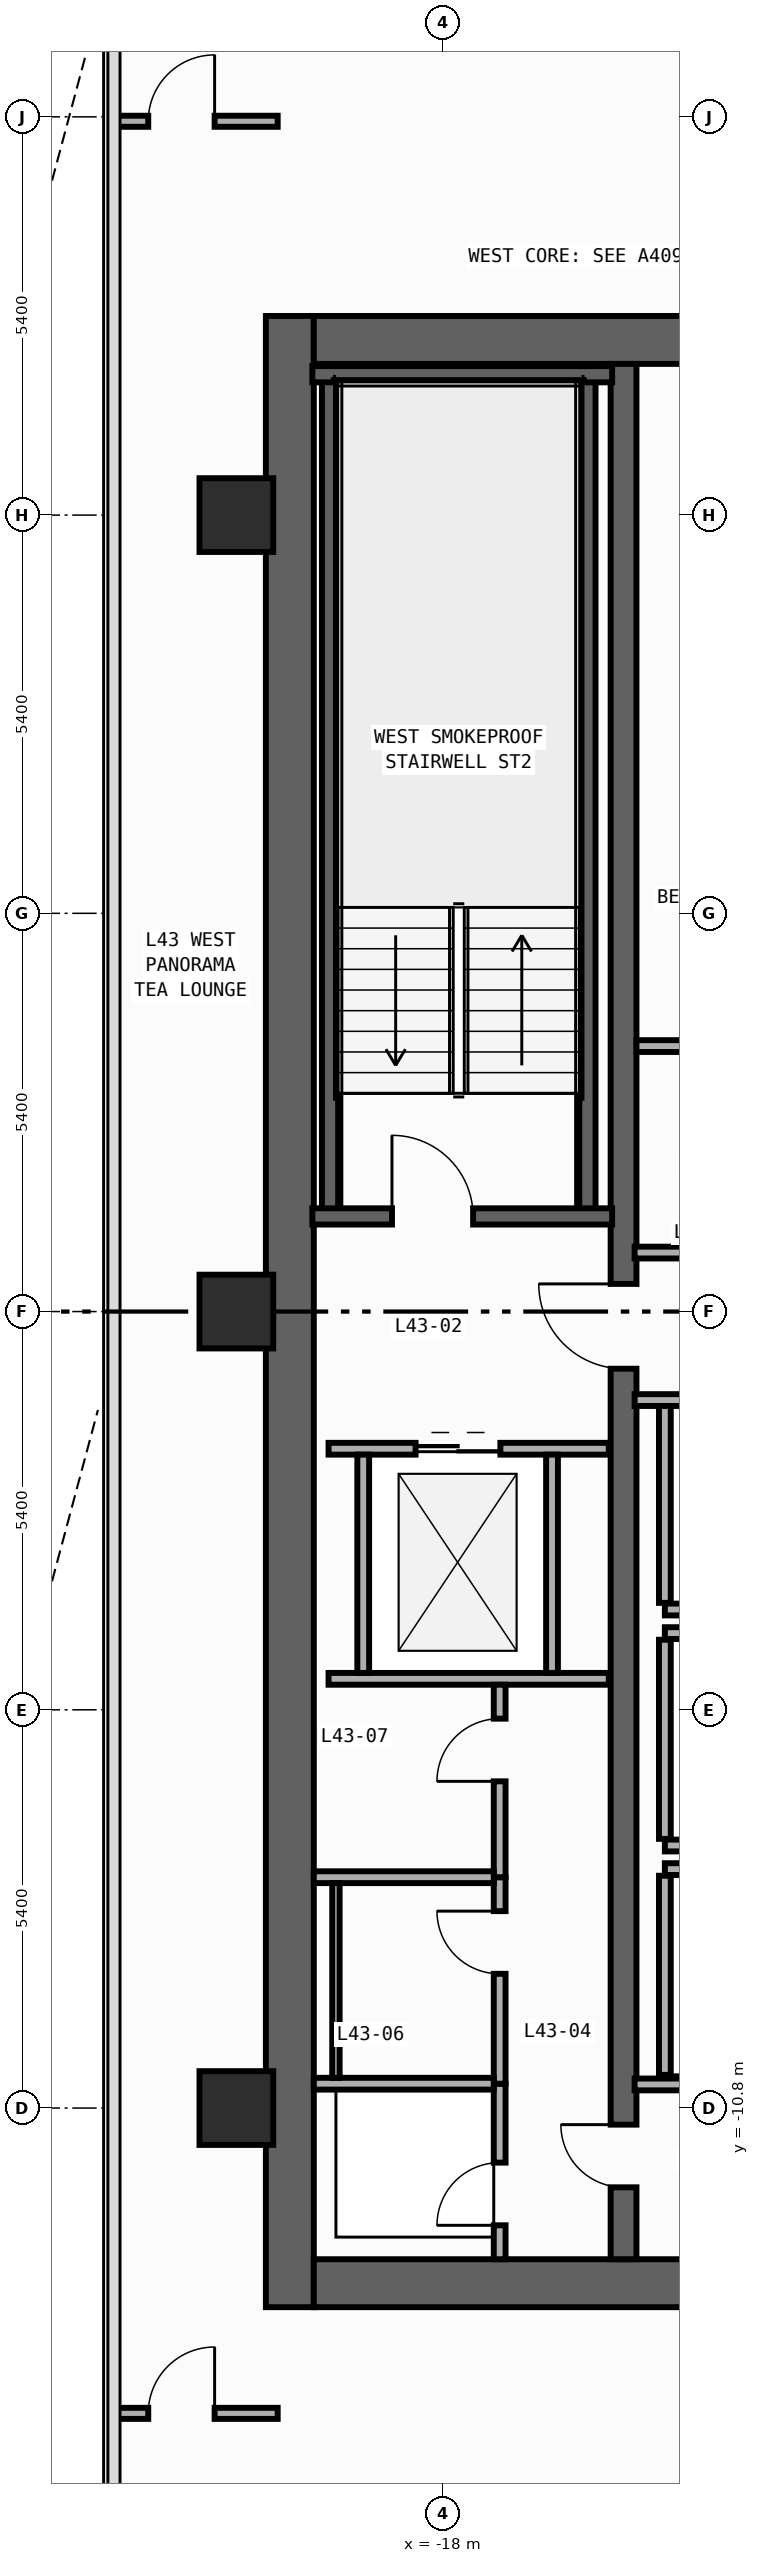
"""IFC4 building model, lengths in metres.
Left out: names, types, materials, properties, quantities, classifications, styles, units other than length and angle.
Written with IfcOpenShell. Run it as: python <this file> out.ifc"""

import sys

from ifc_helpers import new_model, si_unit, direction, frame, frame_2d, origin, origin_2d, place, context, subcontext, project, spatial, rectangle, extrude, element, fill, save


model = new_model("IFC4")
c1 = context("Model", 3, precision=1e-05, world=origin(), true_north=direction((0.0, 1.0)))
c2 = subcontext(c1, "Body", "Model", "MODEL_VIEW")
j1 = project(units=[si_unit("LENGTHUNIT", "METRE"), si_unit("PLANEANGLEUNIT", "RADIAN")], contexts=[c1])
p1 = place(None, origin())
s1 = spatial("IfcSite", under=j1, at=p1, CompositionType="ELEMENT")
p2 = place(p1, origin())
s2 = spatial("IfcBuilding", under=s1, at=p2, CompositionType="ELEMENT")
p3 = place(p2, frame((0.0, 0.0, 187.8)))
s3 = spatial("IfcBuildingStorey", under=s2, at=p3, CompositionType="ELEMENT", Elevation=187.8)
p4 = place(p3, frame((-20.075, -13.5, 0.0), z_axis=(0.0, 0.0, 1.0), x_axis=(0.0, 1.0, 0.0)))
e1 = element("IfcWall", 1, at=p4, inside=s3, PredefinedType="SHEAR", context=c2, shape_type="SweptSolid", body=[
    extrude(rectangle(XDim=27.0, YDim=0.65, at=frame_2d((13.5, 0.0))), origin(), (0.0, 0.0, 1.0), 3.54),
])
for number, where, z_axis, x_axis in (
    (2, (-19.75, -13.175, 0.0), (0.0, 0.0, 1.0), (1.0, 0.0, 0.0)),
    (3, (-19.75, 13.175, 0.0), (0.0, 0.0, 1.0), (1.0, 0.0, 0.0)),
):
    element("IfcWall", number, at=place(p3, frame(where, z_axis=z_axis, x_axis=x_axis)), inside=s3, PredefinedType="SHEAR", context=c2, shape_type="SweptSolid", body=[
        extrude(rectangle(XDim=7.1, YDim=0.65, at=frame_2d((3.55, 0.0))), origin(), (0.0, 0.0, 1.0), 3.54),
    ])
p5 = place(p3, frame((-15.55, -12.85, 0.0), z_axis=(0.0, 0.0, 1.0), x_axis=(0.0, 1.0, 0.0)))
e4 = element("IfcWall", 4, at=p5, inside=s3, PredefinedType="SHEAR", context=c2, shape_type="SweptSolid", body=[
    extrude(rectangle(XDim=25.7, YDim=0.35, at=frame_2d((12.85, 0.0))), origin(), (0.0, 0.0, 1.0), 3.54),
])
p6 = place(p5, frame((12.075, 0.0, 0.0)))
e5 = element("IfcOpeningElement", 5, at=p6, cuts=e4, PredefinedType="OPENING", context=c2, shape_type="SweptSolid", body=[
    extrude(rectangle(XDim=1.15, YDim=2.2, at=frame_2d((0.575, 1.1))), frame((0.0, 0.185, 0.0), z_axis=(0.0, -1.0, 0.0), x_axis=(1.0, 0.0, 0.0)), (0.0, 0.0, 1.0), 0.37),
])
p7 = place(p5, frame((0.975, 0.0, 0.0)))
e6 = element("IfcOpeningElement", 6, at=p7, cuts=e4, PredefinedType="OPENING", context=c2, shape_type="SweptSolid", body=[
    extrude(rectangle(XDim=0.85, YDim=2.1, at=frame_2d((0.425, 1.05))), frame((0.0, 0.185, 0.0), z_axis=(0.0, -1.0, 0.0), x_axis=(1.0, 0.0, 0.0)), (0.0, 0.0, 1.0), 0.37),
])
for number, where, z_axis, x_axis in (
    (7, (-16.04, 1.29, 0.0), (0.0, 0.0, 1.0), (0.0, 1.0, 0.0)),
    (8, (-19.53, 1.29, 0.0), (0.0, 0.0, 1.0), (0.0, 1.0, 0.0)),
):
    element("IfcWall", number, at=place(p3, frame(where, z_axis=z_axis, x_axis=x_axis)), inside=s3, PredefinedType="SHEAR", context=c2, shape_type="SweptSolid", body=[
        extrude(rectangle(XDim=11.42, YDim=0.22, at=frame_2d((5.71, 0.0))), origin(), (0.0, 0.0, 1.0), 3.54),
    ])
p8 = place(p3, frame((-19.77, 12.71, 0.0), z_axis=(0.0, 0.0, 1.0), x_axis=(1.0, 0.0, 0.0)))
e9 = element("IfcWall", 9, at=p8, inside=s3, PredefinedType="SHEAR", context=c2, shape_type="SweptSolid", body=[
    extrude(rectangle(XDim=4.065, YDim=0.22, at=frame_2d((2.032, 0.0))), origin(), (0.0, 0.0, 1.0), 3.54),
])
p9 = place(p3, frame((-19.77, 1.29, 0.0), z_axis=(0.0, 0.0, 1.0), x_axis=(1.0, 0.0, 0.0)))
e10 = element("IfcWall", 10, at=p9, inside=s3, PredefinedType="SHEAR", context=c2, shape_type="SweptSolid", body=[
    extrude(rectangle(XDim=4.065, YDim=0.22, at=frame_2d((2.032, 0.0))), origin(), (0.0, 0.0, 1.0), 3.54),
])
p10 = place(p9, frame((1.08, 0.0, 0.0)))
e11 = element("IfcOpeningElement", 11, at=p10, cuts=e10, PredefinedType="OPENING", context=c2, shape_type="SweptSolid", body=[
    extrude(rectangle(XDim=1.1, YDim=2.2, at=frame_2d((0.55, 1.1))), frame((0.0, 0.12, 0.0), z_axis=(0.0, -1.0, 0.0), x_axis=(1.0, 0.0, 0.0)), (0.0, 0.0, 1.0), 0.24),
])
for number, where, z_axis, x_axis in (
    (12, (-20.8, -10.8, 0.0), (0.0, 0.0, 1.0), (1.0, 0.0, 0.0)),
    (13, (-20.8, 0.0, 0.0), (0.0, 0.0, 1.0), (1.0, 0.0, 0.0)),
    (14, (-20.8, 10.8, 0.0), (0.0, 0.0, 1.0), (1.0, 0.0, 0.0)),
):
    element("IfcColumn", number, at=place(p3, frame(where, z_axis=z_axis, x_axis=x_axis)), inside=s3, PredefinedType="COLUMN", context=c2, shape_type="SweptSolid", body=[
        extrude(rectangle(XDim=1.0, YDim=1.0, at=origin_2d()), origin(), (0.0, 0.0, 1.0), 3.8),
    ])
p11 = place(p3, frame((-14.99, -4.04, 0.0), z_axis=(0.0, 0.0, 1.0), x_axis=(1.0, 0.0, 0.0)))
e15 = element("IfcWall", 15, at=p11, inside=s3, PredefinedType="STANDARD", context=c2, shape_type="SweptSolid", body=[
    extrude(rectangle(XDim=2.34, YDim=0.16, at=frame_2d((1.17, 0.0))), origin(), (0.0, 0.0, 1.0), 3.54),
])
p12 = place(p3, frame((-14.99, -3.95, 0.0), z_axis=(0.0, 0.0, 1.0), x_axis=(0.0, 1.0, 0.0)))
e16 = element("IfcWall", 16, at=p12, inside=s3, PredefinedType="STANDARD", context=c2, shape_type="SweptSolid", body=[
    extrude(rectangle(XDim=2.7, YDim=0.16, at=frame_2d((1.35, 0.0))), origin(), (0.0, 0.0, 1.0), 3.54),
])
for number, where, z_axis, x_axis in (
    (17, (-14.99, -7.24, 0.0), (0.0, 0.0, 1.0), (1.0, 0.0, 0.0)),
    (18, (-14.99, -4.36, 0.0), (0.0, 0.0, 1.0), (1.0, 0.0, 0.0)),
):
    element("IfcWall", number, at=place(p3, frame(where, z_axis=z_axis, x_axis=x_axis)), inside=s3, PredefinedType="STANDARD", context=c2, shape_type="SweptSolid", body=[
        extrude(rectangle(XDim=2.34, YDim=0.16, at=frame_2d((1.17, 0.0))), origin(), (0.0, 0.0, 1.0), 3.54),
    ])
p13 = place(p3, frame((-14.99, -7.15, 0.0), z_axis=(0.0, 0.0, 1.0), x_axis=(0.0, 1.0, 0.0)))
e19 = element("IfcWall", 19, at=p13, inside=s3, PredefinedType="STANDARD", context=c2, shape_type="SweptSolid", body=[
    extrude(rectangle(XDim=2.7, YDim=0.16, at=frame_2d((1.35, 0.0))), origin(), (0.0, 0.0, 1.0), 3.54),
])
p14 = place(p3, frame((-14.99, -7.56, 0.0), z_axis=(0.0, 0.0, 1.0), x_axis=(1.0, 0.0, 0.0)))
e20 = element("IfcWall", 20, at=p14, inside=s3, PredefinedType="STANDARD", context=c2, shape_type="SweptSolid", body=[
    extrude(rectangle(XDim=2.34, YDim=0.16, at=frame_2d((1.17, 0.0))), origin(), (0.0, 0.0, 1.0), 3.54),
])
p15 = place(p3, frame((-14.99, -10.35, 0.0), z_axis=(0.0, 0.0, 1.0), x_axis=(0.0, 1.0, 0.0)))
e21 = element("IfcWall", 21, at=p15, inside=s3, PredefinedType="STANDARD", context=c2, shape_type="SweptSolid", body=[
    extrude(rectangle(XDim=2.7, YDim=0.16, at=frame_2d((1.35, 0.0))), origin(), (0.0, 0.0, 1.0), 3.54),
])
p16 = place(p3, frame((-19.55, -1.86, 0.0), z_axis=(0.0, 0.0, 1.0), x_axis=(1.0, 0.0, 0.0)))
e22 = element("IfcWall", 22, at=p16, inside=s3, PredefinedType="STANDARD", context=c2, shape_type="SweptSolid", body=[
    extrude(rectangle(XDim=3.8, YDim=0.16, at=frame_2d((1.9, 0.0))), origin(), (0.0, 0.0, 1.0), 3.54),
])
p17 = place(p16, frame((1.18, 0.0, 0.0)))
e23 = element("IfcOpeningElement", 23, at=p17, cuts=e22, PredefinedType="OPENING", context=c2, shape_type="SweptSolid", body=[
    extrude(rectangle(XDim=1.15, YDim=2.2, at=frame_2d((0.575, 1.1))), frame((0.0, 0.09, 0.0), z_axis=(0.0, -1.0, 0.0), x_axis=(1.0, 0.0, 0.0)), (0.0, 0.0, 1.0), 0.18),
])
p18 = place(p3, frame((-19.55, -4.98, 0.0), z_axis=(0.0, 0.0, 1.0), x_axis=(1.0, 0.0, 0.0)))
e24 = element("IfcWall", 24, at=p18, inside=s3, PredefinedType="STANDARD", context=c2, shape_type="SweptSolid", body=[
    extrude(rectangle(XDim=3.8, YDim=0.16, at=frame_2d((1.9, 0.0))), origin(), (0.0, 0.0, 1.0), 3.54),
])
for number, where, z_axis, x_axis in (
    (25, (-19.08, -4.9, 0.0), (0.0, 0.0, 1.0), (0.0, 1.0, 0.0)),
    (26, (-16.52, -4.9, 0.0), (0.0, 0.0, 1.0), (0.0, 1.0, 0.0)),
):
    element("IfcWall", number, at=place(p3, frame(where, z_axis=z_axis, x_axis=x_axis)), inside=s3, PredefinedType="STANDARD", context=c2, shape_type="SweptSolid", body=[
        extrude(rectangle(XDim=2.96, YDim=0.16, at=frame_2d((1.48, 0.0))), origin(), (0.0, 0.0, 1.0), 3.54),
    ])
for number, where, z_axis, x_axis in (
    (27, (-15.4, 0.8, 0.0), (0.0, 0.0, 1.0), (1.0, 0.0, 0.0)),
    (28, (-15.4, -1.2, 0.0), (0.0, 0.0, 1.0), (1.0, 0.0, 0.0)),
    (29, (-15.4, -10.48, 0.0), (0.0, 0.0, 1.0), (1.0, 0.0, 0.0)),
):
    element("IfcWall", number, at=place(p3, frame(where, z_axis=z_axis, x_axis=x_axis)), inside=s3, PredefinedType="STANDARD", context=c2, shape_type="SweptSolid", body=[
        extrude(rectangle(XDim=2.6, YDim=0.16, at=frame_2d((1.3, 0.0))), origin(), (0.0, 0.0, 1.0), 3.54),
    ])
p19 = place(p3, frame((-17.23, -12.85, 0.0), z_axis=(0.0, 0.0, 1.0), x_axis=(0.0, 1.0, 0.0)))
e30 = element("IfcWall", 30, at=p19, inside=s3, PredefinedType="PARTITIONING", context=c2, shape_type="SweptSolid", body=[
    extrude(rectangle(XDim=2.38, YDim=0.16, at=frame_2d((1.19, 0.0))), origin(), (0.0, 0.0, 1.0), 3.54),
])
p20 = place(p19, frame((0.46, 0.0, 0.0)))
e31 = element("IfcOpeningElement", 31, at=p20, cuts=e30, PredefinedType="OPENING", context=c2, shape_type="SweptSolid", body=[
    extrude(rectangle(XDim=0.85, YDim=2.1, at=frame_2d((0.425, 1.05))), frame((0.0, 0.09, 0.0), z_axis=(0.0, -1.0, 0.0), x_axis=(1.0, 0.0, 0.0)), (0.0, 0.0, 1.0), 0.18),
])
p21 = place(p3, frame((-17.23, -10.47, 0.0), z_axis=(0.0, 0.0, 1.0), x_axis=(0.0, 1.0, 0.0)))
e32 = element("IfcWall", 32, at=p21, inside=s3, PredefinedType="PARTITIONING", context=c2, shape_type="SweptSolid", body=[
    extrude(rectangle(XDim=2.8, YDim=0.16, at=frame_2d((1.4, 0.0))), origin(), (0.0, 0.0, 1.0), 3.54),
])
p22 = place(p21, frame((1.49, 0.0, 0.0)))
e33 = element("IfcOpeningElement", 33, at=p22, cuts=e32, PredefinedType="OPENING", context=c2, shape_type="SweptSolid", body=[
    extrude(rectangle(XDim=0.85, YDim=2.1, at=frame_2d((0.425, 1.05))), frame((0.0, 0.09, 0.0), z_axis=(0.0, -1.0, 0.0), x_axis=(1.0, 0.0, 0.0)), (0.0, 0.0, 1.0), 0.18),
])
p23 = place(p3, frame((-17.23, -7.67, 0.0), z_axis=(0.0, 0.0, 1.0), x_axis=(0.0, 1.0, 0.0)))
e34 = element("IfcWall", 34, at=p23, inside=s3, PredefinedType="PARTITIONING", context=c2, shape_type="SweptSolid", body=[
    extrude(rectangle(XDim=2.61, YDim=0.16, at=frame_2d((1.305, 0.0))), origin(), (0.0, 0.0, 1.0), 3.54),
])
p24 = place(p23, frame((1.3, 0.0, 0.0)))
e35 = element("IfcOpeningElement", 35, at=p24, cuts=e34, PredefinedType="OPENING", context=c2, shape_type="SweptSolid", body=[
    extrude(rectangle(XDim=0.85, YDim=2.1, at=frame_2d((0.425, 1.05))), frame((0.0, 0.09, 0.0), z_axis=(0.0, -1.0, 0.0), x_axis=(1.0, 0.0, 0.0)), (0.0, 0.0, 1.0), 0.18),
])
for number, where, z_axis, x_axis in (
    (36, (-19.75, -10.47, 0.0), (0.0, 0.0, 1.0), (1.0, 0.0, 0.0)),
    (37, (-19.75, -7.67, 0.0), (0.0, 0.0, 1.0), (1.0, 0.0, 0.0)),
):
    element("IfcWall", number, at=place(p3, frame(where, z_axis=z_axis, x_axis=x_axis)), inside=s3, PredefinedType="PARTITIONING", context=c2, shape_type="SweptSolid", body=[
        extrude(rectangle(XDim=2.44, YDim=0.16, at=frame_2d((1.22, 0.0))), origin(), (0.0, 0.0, 1.0), 3.54),
    ])
p25 = place(p3, frame((-15.375, 3.6, 0.0), z_axis=(0.0, 0.0, 1.0), x_axis=(1.0, 0.0, 0.0)))
e38 = element("IfcWall", 38, at=p25, inside=s3, PredefinedType="PARTITIONING", context=c2, shape_type="SweptSolid", body=[
    extrude(rectangle(XDim=3.065, YDim=0.16, at=frame_2d((1.532, 0.0))), origin(), (0.0, 0.0, 1.0), 3.54),
])
p26 = place(p3, frame((-22.455, 16.14, 0.0), z_axis=(0.0, 0.0, 1.0), x_axis=(1.0, 0.0, 0.0)))
e39 = element("IfcWall", 39, at=p26, inside=s3, PredefinedType="PARTITIONING", context=c2, shape_type="SweptSolid", body=[
    extrude(rectangle(XDim=2.215, YDim=0.15, at=frame_2d((1.107, 0.0))), origin(), (0.0, 0.0, 1.0), 3.54),
])
p27 = place(p26, frame((0.46, 0.0, 0.0)))
e40 = element("IfcOpeningElement", 40, at=p27, cuts=e39, PredefinedType="OPENING", context=c2, shape_type="SweptSolid", body=[
    extrude(rectangle(XDim=0.9, YDim=2.15, at=frame_2d((0.45, 1.075))), frame((0.0, 0.085, 0.0), z_axis=(0.0, -1.0, 0.0), x_axis=(1.0, 0.0, 0.0)), (0.0, 0.0, 1.0), 0.17),
])
p28 = place(p3, frame((-22.455, -14.94, 0.0), z_axis=(0.0, 0.0, 1.0), x_axis=(1.0, 0.0, 0.0)))
e41 = element("IfcWall", 41, at=p28, inside=s3, PredefinedType="PARTITIONING", context=c2, shape_type="SweptSolid", body=[
    extrude(rectangle(XDim=2.215, YDim=0.15, at=frame_2d((1.107, 0.0))), origin(), (0.0, 0.0, 1.0), 3.54),
])
p29 = place(p28, frame((0.46, 0.0, 0.0)))
e42 = element("IfcOpeningElement", 42, at=p29, cuts=e41, PredefinedType="OPENING", context=c2, shape_type="SweptSolid", body=[
    extrude(rectangle(XDim=0.9, YDim=2.15, at=frame_2d((0.45, 1.075))), frame((0.0, 0.085, 0.0), z_axis=(0.0, -1.0, 0.0), x_axis=(1.0, 0.0, 0.0)), (0.0, 0.0, 1.0), 0.17),
])
p30 = place(p3, frame((-19.45, -10.39, 0.0), z_axis=(0.0, 0.0, 1.0), x_axis=(0.0, 1.0, 0.0)))
e43 = element("IfcWall", 43, at=p30, inside=s3, PredefinedType="PARTITIONING", context=c2, shape_type="SweptSolid", body=[
    extrude(rectangle(XDim=2.64, YDim=0.1, at=frame_2d((1.32, 0.0))), origin(), (0.0, 0.0, 1.0), 3.54),
])
p31 = place(p10, origin())
e44 = element("IfcDoor", 44, at=p31, inside=s3, OperationType="SINGLE_SWING_LEFT", PredefinedType="DOOR", context=c2, shape_type="SweptSolid", body=[
    extrude(rectangle(XDim=1.1, YDim=2.2, at=frame_2d((0.55, 1.1))), frame((0.0, 0.025, 0.0), z_axis=(0.0, -1.0, 0.0), x_axis=(1.0, 0.0, 0.0)), (0.0, 0.0, 1.0), 0.05),
])
fill(e11, e44)
p32 = place(p6, origin())
e45 = element("IfcDoor", 45, at=p32, inside=s3, OperationType="SINGLE_SWING_RIGHT", PredefinedType="DOOR", context=c2, shape_type="SweptSolid", body=[
    extrude(rectangle(XDim=1.15, YDim=2.2, at=frame_2d((0.575, 1.1))), frame((0.0, 0.025, 0.0), z_axis=(0.0, -1.0, 0.0), x_axis=(1.0, 0.0, 0.0)), (0.0, 0.0, 1.0), 0.05),
])
fill(e5, e45)
p33 = place(p7, origin())
e46 = element("IfcDoor", 46, at=p33, inside=s3, OperationType="SINGLE_SWING_RIGHT", PredefinedType="DOOR", context=c2, shape_type="SweptSolid", body=[
    extrude(rectangle(XDim=0.85, YDim=2.1, at=frame_2d((0.425, 1.05))), frame((0.0, 0.025, 0.0), z_axis=(0.0, -1.0, 0.0), x_axis=(1.0, 0.0, 0.0)), (0.0, 0.0, 1.0), 0.05),
])
fill(e6, e46)
p34 = place(p17, origin())
e47 = element("IfcDoor", 47, at=p34, inside=s3, OperationType="DOUBLE_DOOR_SLIDING", PredefinedType="DOOR", context=c2, shape_type="SweptSolid", body=[
    extrude(rectangle(XDim=1.15, YDim=2.2, at=frame_2d((0.575, 1.1))), frame((0.0, 0.025, 0.0), z_axis=(0.0, -1.0, 0.0), x_axis=(1.0, 0.0, 0.0)), (0.0, 0.0, 1.0), 0.05),
])
fill(e23, e47)
p35 = place(p20, origin())
e48 = element("IfcDoor", 48, at=p35, inside=s3, OperationType="SINGLE_SWING_LEFT", PredefinedType="DOOR", context=c2, shape_type="SweptSolid", body=[
    extrude(rectangle(XDim=0.85, YDim=2.1, at=frame_2d((0.425, 1.05))), frame((0.0, 0.025, 0.0), z_axis=(0.0, -1.0, 0.0), x_axis=(1.0, 0.0, 0.0)), (0.0, 0.0, 1.0), 0.05),
])
fill(e31, e48)
p36 = place(p22, origin())
e49 = element("IfcDoor", 49, at=p36, inside=s3, OperationType="SINGLE_SWING_RIGHT", PredefinedType="DOOR", context=c2, shape_type="SweptSolid", body=[
    extrude(rectangle(XDim=0.85, YDim=2.1, at=frame_2d((0.425, 1.05))), frame((0.0, 0.025, 0.0), z_axis=(0.0, -1.0, 0.0), x_axis=(1.0, 0.0, 0.0)), (0.0, 0.0, 1.0), 0.05),
])
fill(e33, e49)
p37 = place(p24, origin())
e50 = element("IfcDoor", 50, at=p37, inside=s3, OperationType="SINGLE_SWING_LEFT", PredefinedType="DOOR", context=c2, shape_type="SweptSolid", body=[
    extrude(rectangle(XDim=0.85, YDim=2.1, at=frame_2d((0.425, 1.05))), frame((0.0, 0.025, 0.0), z_axis=(0.0, -1.0, 0.0), x_axis=(1.0, 0.0, 0.0)), (0.0, 0.0, 1.0), 0.05),
])
fill(e35, e50)
p38 = place(p27, origin())
e51 = element("IfcDoor", 51, at=p38, inside=s3, OperationType="SINGLE_SWING_RIGHT", PredefinedType="DOOR", context=c2, shape_type="SweptSolid", body=[
    extrude(rectangle(XDim=0.9, YDim=2.15, at=frame_2d((0.45, 1.075))), frame((0.0, 0.025, 0.0), z_axis=(0.0, -1.0, 0.0), x_axis=(1.0, 0.0, 0.0)), (0.0, 0.0, 1.0), 0.05),
])
fill(e40, e51)
p39 = place(p29, origin())
e52 = element("IfcDoor", 52, at=p39, inside=s3, OperationType="SINGLE_SWING_RIGHT", PredefinedType="DOOR", context=c2, shape_type="SweptSolid", body=[
    extrude(rectangle(XDim=0.9, YDim=2.15, at=frame_2d((0.45, 1.075))), frame((0.0, 0.025, 0.0), z_axis=(0.0, -1.0, 0.0), x_axis=(1.0, 0.0, 0.0)), (0.0, 0.0, 1.0), 0.05),
])
fill(e42, e52)
save(model, sys.argv[1])
